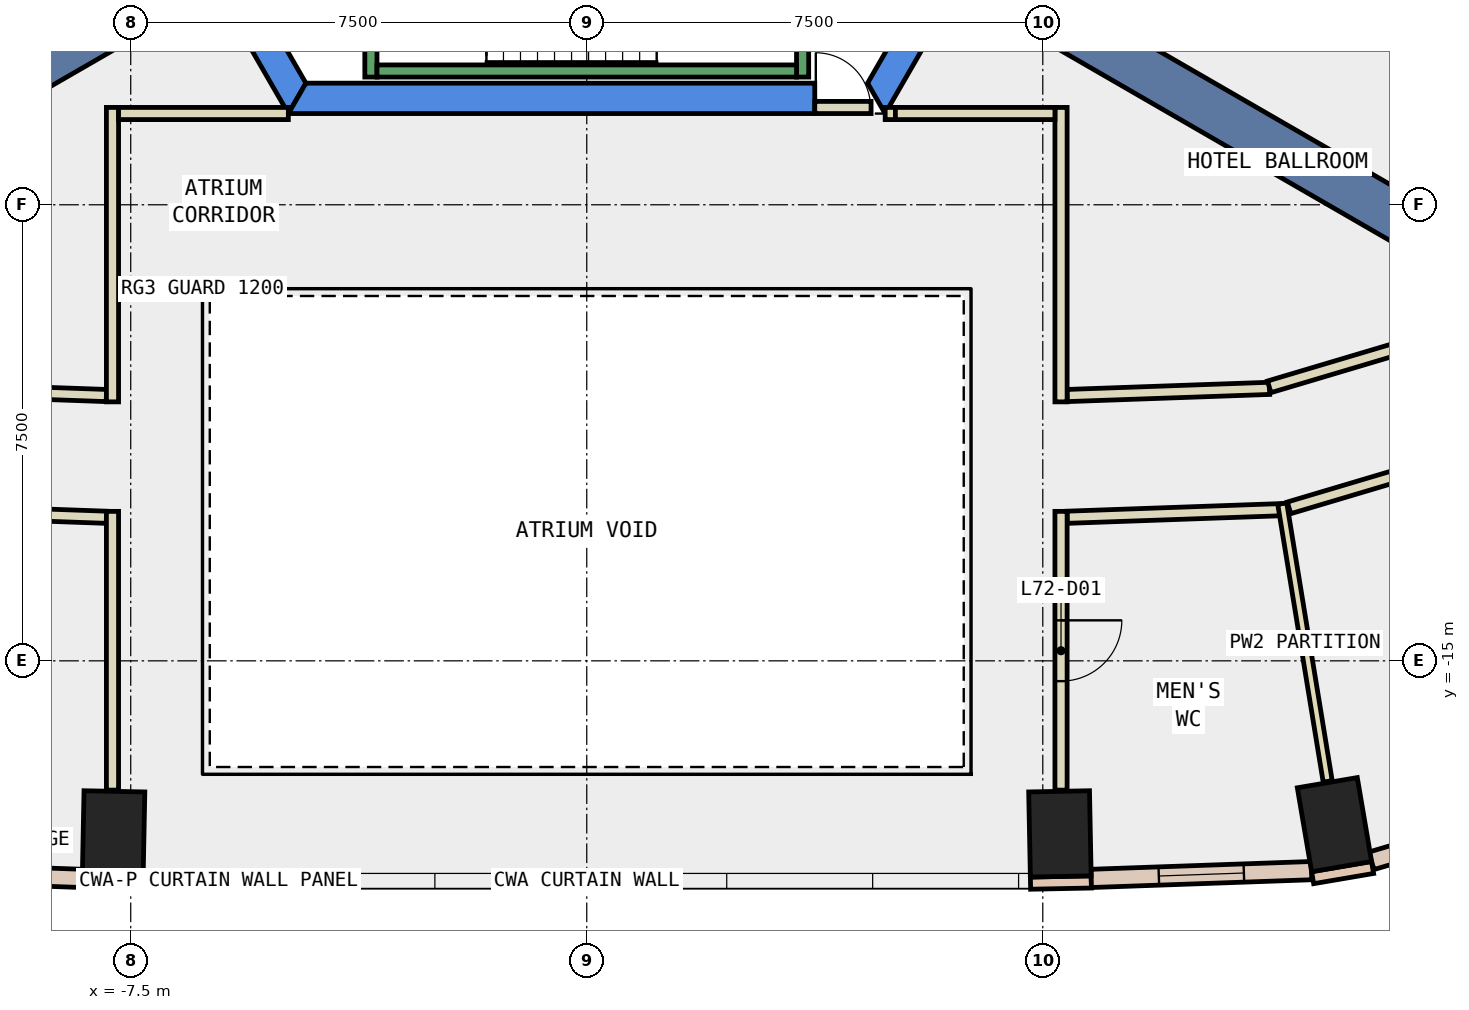
"""IFC4 building model, lengths in metres.
Left out: names, types, materials, properties, quantities, classifications, styles, units other than length and angle.
Written with IfcOpenShell. Run it as: python <this file> out.ifc"""

import sys

from ifc_helpers import new_model, si_unit, direction, frame, frame_2d, origin, origin_2d, place, context, subcontext, project, spatial, polyline, rectangle, outline, extrude, element, fill, save


model = new_model("IFC4")
c1 = context("Model", 3, precision=1e-05, world=origin(), true_north=direction((0.0, 1.0)))
c2 = subcontext(c1, "Body", "Model", "MODEL_VIEW")
j1 = project(units=[si_unit("LENGTHUNIT", "METRE"), si_unit("PLANEANGLEUNIT", "RADIAN")], contexts=[c1])
p1 = place(None, origin())
s1 = spatial("IfcSite", under=j1, at=p1, CompositionType="ELEMENT")
p2 = place(p1, origin())
s2 = spatial("IfcBuilding", under=s1, at=p2, CompositionType="ELEMENT")
p3 = place(p2, frame((0.0, 0.0, 308.0)))
s3 = spatial("IfcBuildingStorey", under=s2, at=p3, CompositionType="ELEMENT", Elevation=308.0)
for number, where, z_axis, x_axis in (
    (1, (-7.782, -17.846, -0.34), (0.0, 0.0, 1.0), (-1.0, 0.02, 0.0)),
    (2, (7.782, -17.846, -0.34), (0.0, 0.0, 1.0), (1.0, 0.02, 0.0)),
    (3, (12.297, -17.694, -0.34), (0.0, 0.0, 1.0), (0.986, 0.168, 0.0)),
):
    element("IfcColumn", number, at=place(p3, frame(where, z_axis=z_axis, x_axis=x_axis)), inside=s3, PredefinedType="COLUMN", context=c2, shape_type="SweptSolid", body=[
        extrude(rectangle(XDim=1.0, YDim=1.4, at=origin_2d()), origin(), (0.0, 0.0, 1.0), 3.6),
    ])
p4 = place(p3, frame((0.0, 0.0, -0.34)))
e4 = element("IfcWall", 4, at=p4, inside=s3, PredefinedType="SHEAR", context=c2, shape_type="SweptSolid", body=[
    extrude(outline(polyline([(-9.815, 2.5), (-4.907, -6.0), (-4.619, -5.5), (-9.238, 2.5), (-9.815, 2.5)])), origin(), (0.0, 0.0, 1.0), 3.6),
])
p5 = place(p3, frame((0.0, 0.0, -0.34)))
e5 = element("IfcWall", 5, at=p5, inside=s3, PredefinedType="SHEAR", context=c2, shape_type="SweptSolid", body=[
    extrude(outline(polyline([(3.75, -6.0), (3.75, -5.5), (-4.619, -5.5), (-4.907, -6.0), (3.75, -6.0)])), origin(), (0.0, 0.0, 1.0), 3.6),
])
p6 = place(p3, frame((0.0, 0.0, -0.34)))
e6 = element("IfcWall", 6, at=p6, inside=s3, PredefinedType="SHEAR", context=c2, shape_type="SweptSolid", body=[
    extrude(outline(polyline([(4.907, -6.0), (9.815, 2.5), (9.238, 2.5), (4.619, -5.5), (4.907, -6.0)])), origin(), (0.0, 0.0, 1.0), 3.6),
])
for number, where, z_axis, x_axis in (
    (7, (6.279, -3.625, -0.34), (0.0, 0.0, 1.0), (0.866, -0.5, 0.0)),
    (8, (-6.279, -3.625, -0.34), (0.0, 0.0, 1.0), (-0.866, -0.5, 0.0)),
):
    element("IfcWall", number, at=place(p3, frame(where, z_axis=z_axis, x_axis=x_axis)), inside=s3, PredefinedType="SHEAR", context=c2, shape_type="SweptSolid", body=[
        extrude(rectangle(XDim=9.0, YDim=0.8, at=frame_2d((4.5, 0.0))), origin(), (0.0, 0.0, 1.0), 3.6),
    ])
for number, where, z_axis, x_axis in (
    (9, (-8.298, -18.636, 0.0), (0.0, 0.0, 1.0), (1.0, -0.02, 0.0)),
    (10, (7.298, -18.656, 0.0), (0.0, 0.0, 1.0), (1.0, 0.02, 0.0)),
    (11, (11.938, -18.566, 0.0), (0.0, 0.0, 1.0), (0.986, 0.168, 0.0)),
):
    element("IfcWall", number, at=place(p3, frame(where, z_axis=z_axis, x_axis=x_axis)), inside=s3, PredefinedType="STANDARD", context=c2, shape_type="SweptSolid", body=[
        extrude(rectangle(XDim=1.0, YDim=0.2, at=frame_2d((0.5, 0.0))), origin(), (0.0, 0.0, 1.0), 3.26),
    ])
p7 = place(p3, frame((-11.919, -18.45, 0.0), z_axis=(0.0, 0.0, 1.0), x_axis=(0.999377185233, -0.035287981473, 0.0)))
e12 = element("IfcWall", 12, at=p7, inside=s3, PredefinedType="STANDARD", context=c2, shape_type="SweptSolid", body=[
    extrude(rectangle(XDim=3.625, YDim=0.3, at=frame_2d((1.812, 0.0))), origin(), (0.0, 0.0, 1.0), 3.26),
])
p8 = place(p7, frame((1.113, 0.0, 0.9)))
e13 = element("IfcOpeningElement", 13, at=p8, cuts=e12, PredefinedType="OPENING", context=c2, shape_type="SweptSolid", body=[
    extrude(rectangle(XDim=1.4, YDim=2.0, at=frame_2d((0.7, 1.0))), frame((0.0, 0.16, 0.0), z_axis=(0.0, -1.0, 0.0), x_axis=(1.0, 0.0, 0.0)), (0.0, 0.0, 1.0), 0.32),
])
p9 = place(p3, frame((8.296, -18.578, 0.0), z_axis=(0.0, 0.0, 1.0), x_axis=(0.999377185233, 0.035287981473, 0.0)))
e14 = element("IfcWall", 14, at=p9, inside=s3, PredefinedType="STANDARD", context=c2, shape_type="SweptSolid", body=[
    extrude(rectangle(XDim=3.625, YDim=0.3, at=frame_2d((1.812, 0.0))), origin(), (0.0, 0.0, 1.0), 3.26),
])
p10 = place(p9, frame((1.113, 0.0, 0.9)))
e15 = element("IfcOpeningElement", 15, at=p10, cuts=e14, PredefinedType="OPENING", context=c2, shape_type="SweptSolid", body=[
    extrude(rectangle(XDim=1.4, YDim=2.0, at=frame_2d((0.7, 1.0))), frame((0.0, 0.16, 0.0), z_axis=(0.0, -1.0, 0.0), x_axis=(1.0, 0.0, 0.0)), (0.0, 0.0, 1.0), 0.32),
])
p11 = place(p3, frame((12.904, -18.289, 0.0), z_axis=(0.0, 0.0, 1.0), x_axis=(0.95841929886, 0.285363711031, 0.0)))
e16 = element("IfcWall", 16, at=p11, inside=s3, PredefinedType="STANDARD", context=c2, shape_type="SweptSolid", body=[
    extrude(rectangle(XDim=4.777, YDim=0.3, at=frame_2d((2.388, 0.0))), origin(), (0.0, 0.0, 1.0), 3.26),
])
p12 = place(p11, frame((1.688, 0.0, 0.9)))
e17 = element("IfcOpeningElement", 17, at=p12, cuts=e16, PredefinedType="OPENING", context=c2, shape_type="SweptSolid", body=[
    extrude(rectangle(XDim=1.4, YDim=2.0, at=frame_2d((0.7, 1.0))), frame((0.0, 0.16, 0.0), z_axis=(0.0, -1.0, 0.0), x_axis=(1.0, 0.0, 0.0)), (0.0, 0.0, 1.0), 0.32),
])
p13 = place(p3, frame((7.9, -10.637, 0.0), z_axis=(0.0, 0.0, 1.0), x_axis=(0.999372900517, 0.035409119054, 0.0)))
e18 = element("IfcWall", 18, at=p13, inside=s3, PredefinedType="PARTITIONING", context=c2, shape_type="SweptSolid", body=[
    extrude(rectangle(XDim=3.33, YDim=0.2, at=frame_2d((1.665, 0.0))), origin(), (0.0, 0.0, 1.0), 3.26),
])
p14 = place(p3, frame((11.224, -10.494, 0.0), z_axis=(0.0, 0.0, 1.0), x_axis=(0.958417413979, 0.285370041492, 0.0)))
e19 = element("IfcWall", 19, at=p14, inside=s3, PredefinedType="PARTITIONING", context=c2, shape_type="SweptSolid", body=[
    extrude(rectangle(XDim=2.866, YDim=0.2, at=frame_2d((1.433, 0.0))), origin(), (0.0, 0.0, 1.0), 3.26),
])
p15 = place(p3, frame((14.549, -5.107, 0.0), z_axis=(0.0, 0.0, 1.0), x_axis=(-0.47449538478, 0.880257990491, 0.0)))
e20 = element("IfcWall", 20, at=p15, inside=s3, PredefinedType="PARTITIONING", context=c2, shape_type="SweptSolid", body=[
    extrude(rectangle(XDim=7.655, YDim=0.2, at=frame_2d((3.827, 0.0))), origin(), (0.0, 0.0, 1.0), 3.26),
])
p16 = place(p15, frame((2.927, 0.0, 0.0)))
e21 = element("IfcOpeningElement", 21, at=p16, cuts=e20, PredefinedType="OPENING", context=c2, shape_type="SweptSolid", body=[
    extrude(rectangle(XDim=1.8, YDim=2.1, at=frame_2d((0.9, 1.05))), frame((0.0, 0.11, 0.0), z_axis=(0.0, -1.0, 0.0), x_axis=(1.0, 0.0, 0.0)), (0.0, 0.0, 1.0), 0.22),
])
p17 = place(p3, frame((-11.228, -10.519, 0.0), z_axis=(0.0, 0.0, 1.0), x_axis=(0.999372900517, -0.035409119054, 0.0)))
e22 = element("IfcWall", 22, at=p17, inside=s3, PredefinedType="PARTITIONING", context=c2, shape_type="SweptSolid", body=[
    extrude(rectangle(XDim=3.33, YDim=0.2, at=frame_2d((1.665, 0.0))), origin(), (0.0, 0.0, 1.0), 3.26),
])
p18 = place(p3, frame((11.479, -12.512, 0.0), z_axis=(0.0, 0.0, 1.0), x_axis=(-0.999371508837, -0.035448375484, 0.0)))
e23 = element("IfcWall", 23, at=p18, inside=s3, PredefinedType="PARTITIONING", context=c2, shape_type="SweptSolid", body=[
    extrude(rectangle(XDim=3.581, YDim=0.2, at=frame_2d((1.791, 0.0))), origin(), (0.0, 0.0, 1.0), 3.26),
])
p19 = place(p3, frame((15.004, -11.456, 0.0), z_axis=(0.0, 0.0, 1.0), x_axis=(-0.958459796003, -0.285227662485, 0.0)))
e24 = element("IfcWall", 24, at=p19, inside=s3, PredefinedType="PARTITIONING", context=c2, shape_type="SweptSolid", body=[
    extrude(rectangle(XDim=3.604, YDim=0.2, at=frame_2d((1.802, 0.0))), origin(), (0.0, 0.0, 1.0), 3.26),
])
p20 = place(p3, frame((-7.9, -12.639, 0.0), z_axis=(0.0, 0.0, 1.0), x_axis=(-0.999368879246, 0.035522432268, 0.0)))
e25 = element("IfcWall", 25, at=p20, inside=s3, PredefinedType="PARTITIONING", context=c2, shape_type="SweptSolid", body=[
    extrude(rectangle(XDim=3.656, YDim=0.2, at=frame_2d((1.828, 0.0))), origin(), (0.0, 0.0, 1.0), 3.26),
])
p21 = place(p20, frame((1.328, 0.0, 0.0)))
e26 = element("IfcOpeningElement", 26, at=p21, cuts=e25, PredefinedType="OPENING", context=c2, shape_type="SweptSolid", body=[
    extrude(rectangle(XDim=1.0, YDim=2.1, at=frame_2d((0.5, 1.05))), frame((0.0, 0.11, 0.0), z_axis=(0.0, -1.0, 0.0), x_axis=(1.0, 0.0, 0.0)), (0.0, 0.0, 1.0), 0.22),
])
p22 = place(p3, frame((4.908, -5.999, 0.0), z_axis=(0.0, 0.0, 1.0), x_axis=(1.0, 0.0, 0.0)))
e27 = element("IfcWall", 27, at=p22, inside=s3, PredefinedType="PARTITIONING", context=c2, shape_type="SweptSolid", body=[
    extrude(rectangle(XDim=0.168, YDim=0.2, at=frame_2d((0.084, 0.0))), origin(), (0.0, 0.0, 1.0), 2.4),
])
for number, where, z_axis, x_axis in (
    (28, (7.8, -5.899, 0.0), (0.0, 0.0, 1.0), (0.0, -1.0, 0.0)),
    (29, (-7.8, -10.741, 0.0), (0.0, 0.0, 1.0), (0.0, 1.0, 0.0)),
):
    element("IfcWall", number, at=place(p3, frame(where, z_axis=z_axis, x_axis=x_axis)), inside=s3, PredefinedType="PARTITIONING", context=c2, shape_type="SweptSolid", body=[
        extrude(rectangle(XDim=4.842, YDim=0.2, at=frame_2d((2.421, 0.0))), origin(), (0.0, 0.0, 1.0), 3.26),
    ])
p23 = place(p3, frame((-7.7, -5.999, 0.0), z_axis=(0.0, 0.0, 1.0), x_axis=(1.0, 0.0, 0.0)))
e30 = element("IfcWall", 30, at=p23, inside=s3, PredefinedType="PARTITIONING", context=c2, shape_type="SweptSolid", body=[
    extrude(rectangle(XDim=2.792, YDim=0.2, at=frame_2d((1.396, 0.0))), origin(), (0.0, 0.0, 1.0), 3.26),
])
p24 = place(p3, frame((7.8, -12.542, 0.0), z_axis=(0.0, 0.0, 1.0), x_axis=(0.0, -1.0, 0.0)))
e31 = element("IfcWall", 31, at=p24, inside=s3, PredefinedType="PARTITIONING", context=c2, shape_type="SweptSolid", body=[
    extrude(rectangle(XDim=4.584, YDim=0.2, at=frame_2d((2.292, 0.0))), origin(), (0.0, 0.0, 1.0), 3.26),
])
p25 = place(p24, frame((1.792, 0.0, 0.0)))
e32 = element("IfcOpeningElement", 32, at=p25, cuts=e31, PredefinedType="OPENING", context=c2, shape_type="SweptSolid", body=[
    extrude(rectangle(XDim=1.0, YDim=2.1, at=frame_2d((0.5, 1.05))), frame((0.0, 0.11, 0.0), z_axis=(0.0, -1.0, 0.0), x_axis=(1.0, 0.0, 0.0)), (0.0, 0.0, 1.0), 0.22),
])
p26 = place(p3, frame((-7.8, -17.126, 0.0), z_axis=(0.0, 0.0, 1.0), x_axis=(0.0, 1.0, 0.0)))
e33 = element("IfcWall", 33, at=p26, inside=s3, PredefinedType="PARTITIONING", context=c2, shape_type="SweptSolid", body=[
    extrude(rectangle(XDim=4.584, YDim=0.2, at=frame_2d((2.292, 0.0))), origin(), (0.0, 0.0, 1.0), 3.26),
])
p27 = place(p3, frame((11.438, -12.414, 0.0), z_axis=(0.0, 0.0, 1.0), x_axis=(0.161576343941, -0.986860215572, 0.0)))
e34 = element("IfcWall", 34, at=p27, inside=s3, PredefinedType="PARTITIONING", context=c2, shape_type="SweptSolid", body=[
    extrude(rectangle(XDim=4.63, YDim=0.15, at=frame_2d((2.315, 0.0))), origin(), (0.0, 0.0, 1.0), 3.26),
])
p28 = place(p3, frame((3.75, -5.9, 0.0), z_axis=(0.0, 0.0, 1.0), x_axis=(1.0, 0.0, 0.0)))
e35 = element("IfcWall", 35, at=p28, inside=s3, PredefinedType="PARTITIONING", context=c2, shape_type="SweptSolid", body=[
    extrude(rectangle(XDim=0.926, YDim=0.2, at=frame_2d((0.463, 0.0))), origin(), (0.0, 0.0, 1.0), 2.4),
])
p29 = place(p28, frame((0.017, 0.0, 0.0)))
e36 = element("IfcOpeningElement", 36, at=p29, cuts=e35, PredefinedType="OPENING", context=c2, shape_type="SweptSolid", body=[
    extrude(rectangle(XDim=0.9, YDim=2.1, at=frame_2d((0.45, 1.05))), frame((0.0, 0.11, 0.0), z_axis=(0.0, -1.0, 0.0), x_axis=(1.0, 0.0, 0.0)), (0.0, 0.0, 1.0), 0.22),
])
p30 = place(p3, frame((5.076, -5.999, 0.0), z_axis=(0.0, 0.0, 1.0), x_axis=(1.0, 0.0, 0.0)))
e37 = element("IfcWall", 37, at=p30, inside=s3, PredefinedType="PARTITIONING", context=c2, shape_type="SweptSolid", body=[
    extrude(rectangle(XDim=2.624, YDim=0.2, at=frame_2d((1.312, 0.0))), origin(), (0.0, 0.0, 1.0), 3.26),
])
p31 = place(p3, frame((-3.55, -1.0, 0.0), z_axis=(0.0, 0.0, 1.0), x_axis=(0.0, -1.0, 0.0)))
e38 = element("IfcWall", 38, at=p31, inside=s3, PredefinedType="STANDARD", context=c2, shape_type="SweptSolid", body=[
    extrude(rectangle(XDim=4.4, YDim=0.2, at=frame_2d((2.2, 0.0))), origin(), (0.0, 0.0, 1.0), 3.26),
])
p32 = place(p31, frame((2.4, 0.0, 0.0)))
e39 = element("IfcOpeningElement", 39, at=p32, cuts=e38, PredefinedType="OPENING", context=c2, shape_type="SweptSolid", body=[
    extrude(rectangle(XDim=1.1, YDim=2.2, at=frame_2d((0.55, 1.1))), frame((0.0, 0.11, 0.0), z_axis=(0.0, -1.0, 0.0), x_axis=(1.0, 0.0, 0.0)), (0.0, 0.0, 1.0), 0.22),
])
p33 = place(p3, frame((3.55, -2.667, 0.0), z_axis=(0.0, 0.0, 1.0), x_axis=(0.0, -1.0, 0.0)))
e40 = element("IfcWall", 40, at=p33, inside=s3, PredefinedType="STANDARD", context=c2, shape_type="SweptSolid", body=[
    extrude(rectangle(XDim=2.733, YDim=0.2, at=frame_2d((1.366, 0.0))), origin(), (0.0, 0.0, 1.0), 3.26),
])
p34 = place(p3, frame((-3.45, -5.3, 0.0), z_axis=(0.0, 0.0, 1.0), x_axis=(1.0, 0.0, 0.0)))
e41 = element("IfcWall", 41, at=p34, inside=s3, PredefinedType="STANDARD", context=c2, shape_type="SweptSolid", body=[
    extrude(rectangle(XDim=6.9, YDim=0.2, at=frame_2d((3.45, 0.0))), origin(), (0.0, 0.0, 1.0), 3.26),
])
p35 = place(p10, origin())
e42 = element("IfcWindow", 42, at=p35, inside=s3, PartitioningType="SINGLE_PANEL", PredefinedType="WINDOW", context=c2, shape_type="SweptSolid", body=[
    extrude(rectangle(XDim=1.4, YDim=2.0, at=frame_2d((0.7, 1.0))), frame((0.0, 0.03, 0.0), z_axis=(0.0, -1.0, 0.0), x_axis=(1.0, 0.0, 0.0)), (0.0, 0.0, 1.0), 0.06),
])
fill(e15, e42)
p36 = place(p25, origin())
e43 = element("IfcDoor", 43, at=p36, inside=s3, OperationType="SINGLE_SWING_LEFT", PredefinedType="DOOR", context=c2, shape_type="SweptSolid", body=[
    extrude(rectangle(XDim=1.0, YDim=2.1, at=frame_2d((0.5, 1.05))), frame((0.0, 0.025, 0.0), z_axis=(0.0, -1.0, 0.0), x_axis=(1.0, 0.0, 0.0)), (0.0, 0.0, 1.0), 0.05),
])
fill(e32, e43)
p37 = place(p29, origin())
e44 = element("IfcDoor", 44, at=p37, inside=s3, OperationType="SINGLE_SWING_LEFT", PredefinedType="DOOR", context=c2, shape_type="SweptSolid", body=[
    extrude(rectangle(XDim=0.9, YDim=2.1, at=frame_2d((0.45, 1.05))), frame((0.0, 0.025, 0.0), z_axis=(0.0, -1.0, 0.0), x_axis=(1.0, 0.0, 0.0)), (0.0, 0.0, 1.0), 0.05),
])
fill(e36, e44)
save(model, sys.argv[1])
